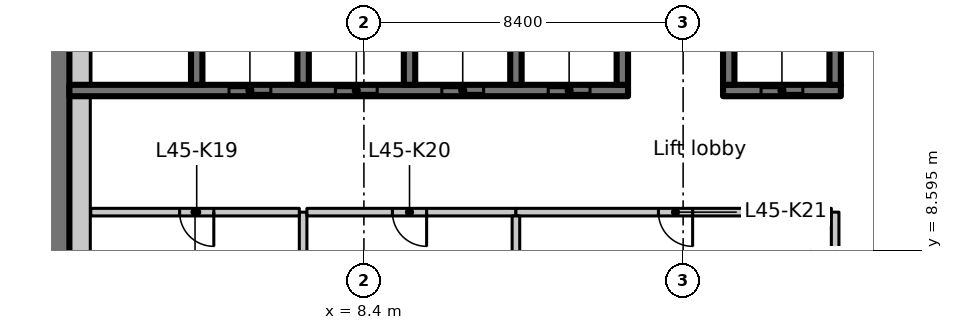
"""IFC4 building model, lengths in metres.
Left out: names, types, materials, properties, quantities, classifications, styles, units other than length and angle.
Written with IfcOpenShell. Run it as: python <this file> out.ifc"""

import sys

from ifc_helpers import new_model, si_unit, direction, frame, frame_2d, origin, place, context, subcontext, project, spatial, rectangle, extrude, element, fill, save


model = new_model("IFC4")
c1 = context("Model", 3, precision=1e-05, world=origin(), true_north=direction((0.0, 1.0)))
c2 = subcontext(c1, "Body", "Model", "MODEL_VIEW")
j1 = project(units=[si_unit("LENGTHUNIT", "METRE"), si_unit("PLANEANGLEUNIT", "RADIAN")], contexts=[c1])
p1 = place(None, origin())
s1 = spatial("IfcSite", under=j1, at=p1, CompositionType="ELEMENT")
p2 = place(p1, origin())
s2 = spatial("IfcBuilding", under=s1, at=p2, CompositionType="ELEMENT")
p3 = place(p2, frame((0.0, 0.0, 181.2)))
s3 = spatial("IfcBuildingStorey", under=s2, at=p3, CompositionType="ELEMENT", Elevation=181.2)
p4 = place(p3, frame((0.325, 7.286, 0.0), z_axis=(0.0, 0.0, 1.0), x_axis=(0.0, 1.0, 0.0)))
e1 = element("IfcWall", 1, at=p4, inside=s3, PredefinedType="SHEAR", context=c2, shape_type="SweptSolid", body=[
    extrude(rectangle(XDim=8.864, YDim=0.65, at=frame_2d((4.432, 0.0))), origin(), (0.0, 0.0, 1.0), 3.35),
])
p5 = place(p3, frame((0.65, 12.8, 0.0), z_axis=(0.0, 0.0, 1.0), x_axis=(1.0, 0.0, 0.0)))
e2 = element("IfcWall", 2, at=p5, inside=s3, PredefinedType="SHEAR", context=c2, shape_type="SweptSolid", body=[
    extrude(rectangle(XDim=14.7, YDim=0.3, at=frame_2d((7.35, 0.0))), origin(), (0.0, 0.0, 1.0), 3.35),
])
p6 = place(p5, frame((4.2, 0.0, 0.0)))
e3 = element("IfcOpeningElement", 3, at=p6, cuts=e2, PredefinedType="OPENING", context=c2, shape_type="SweptSolid", body=[
    extrude(rectangle(XDim=1.1, YDim=2.3, at=frame_2d((0.55, 1.15))), frame((0.0, 0.16, 0.0), z_axis=(0.0, -1.0, 0.0), x_axis=(1.0, 0.0, 0.0)), (0.0, 0.0, 1.0), 0.32),
])
p7 = place(p5, frame((7.0, 0.0, 0.0)))
e4 = element("IfcOpeningElement", 4, at=p7, cuts=e2, PredefinedType="OPENING", context=c2, shape_type="SweptSolid", body=[
    extrude(rectangle(XDim=1.1, YDim=2.3, at=frame_2d((0.55, 1.15))), frame((0.0, 0.16, 0.0), z_axis=(0.0, -1.0, 0.0), x_axis=(1.0, 0.0, 0.0)), (0.0, 0.0, 1.0), 0.32),
])
p8 = place(p5, frame((9.8, 0.0, 0.0)))
e5 = element("IfcOpeningElement", 5, at=p8, cuts=e2, PredefinedType="OPENING", context=c2, shape_type="SweptSolid", body=[
    extrude(rectangle(XDim=1.1, YDim=2.3, at=frame_2d((0.55, 1.15))), frame((0.0, 0.16, 0.0), z_axis=(0.0, -1.0, 0.0), x_axis=(1.0, 0.0, 0.0)), (0.0, 0.0, 1.0), 0.32),
])
p9 = place(p5, frame((12.6, 0.0, 0.0)))
e6 = element("IfcOpeningElement", 6, at=p9, cuts=e2, PredefinedType="OPENING", context=c2, shape_type="SweptSolid", body=[
    extrude(rectangle(XDim=1.1, YDim=2.3, at=frame_2d((0.55, 1.15))), frame((0.0, 0.16, 0.0), z_axis=(0.0, -1.0, 0.0), x_axis=(1.0, 0.0, 0.0)), (0.0, 0.0, 1.0), 0.32),
])
for number, where, z_axis, x_axis in (
    (7, (4.0, 12.95, 0.0), (0.0, 0.0, 1.0), (0.0, 1.0, 0.0)),
    (8, (6.8, 12.95, 0.0), (0.0, 0.0, 1.0), (0.0, 1.0, 0.0)),
    (9, (9.6, 12.95, 0.0), (0.0, 0.0, 1.0), (0.0, 1.0, 0.0)),
    (10, (12.4, 12.95, 0.0), (0.0, 0.0, 1.0), (0.0, 1.0, 0.0)),
    (11, (15.2, 12.95, 0.0), (0.0, 0.0, 1.0), (0.0, 1.0, 0.0)),
):
    element("IfcWall", number, at=place(p3, frame(where, z_axis=z_axis, x_axis=x_axis)), inside=s3, PredefinedType="SHEAR", context=c2, shape_type="SweptSolid", body=[
        extrude(rectangle(XDim=3.2, YDim=0.3, at=frame_2d((1.6, 0.0))), origin(), (0.0, 0.0, 1.0), 3.35),
    ])
p10 = place(p3, frame((17.85, 12.8, 0.0), z_axis=(0.0, 0.0, 1.0), x_axis=(1.0, 0.0, 0.0)))
e12 = element("IfcWall", 12, at=p10, inside=s3, PredefinedType="SHEAR", context=c2, shape_type="SweptSolid", body=[
    extrude(rectangle(XDim=3.1, YDim=0.3, at=frame_2d((1.55, 0.0))), origin(), (0.0, 0.0, 1.0), 3.35),
])
p11 = place(p10, frame((1.0, 0.0, 0.0)))
e13 = element("IfcOpeningElement", 13, at=p11, cuts=e12, PredefinedType="OPENING", context=c2, shape_type="SweptSolid", body=[
    extrude(rectangle(XDim=1.1, YDim=2.3, at=frame_2d((0.55, 1.15))), frame((0.0, 0.16, 0.0), z_axis=(0.0, -1.0, 0.0), x_axis=(1.0, 0.0, 0.0)), (0.0, 0.0, 1.0), 0.32),
])
for number, where, z_axis, x_axis in (
    (14, (18.0, 12.95, 0.0), (0.0, 0.0, 1.0), (0.0, 1.0, 0.0)),
    (15, (20.8, 12.95, 0.0), (0.0, 0.0, 1.0), (0.0, 1.0, 0.0)),
):
    element("IfcWall", number, at=place(p3, frame(where, z_axis=z_axis, x_axis=x_axis)), inside=s3, PredefinedType="SHEAR", context=c2, shape_type="SweptSolid", body=[
        extrude(rectangle(XDim=3.2, YDim=0.3, at=frame_2d((1.6, 0.0))), origin(), (0.0, 0.0, 1.0), 3.35),
    ])
p12 = place(p3, frame((6.8, 9.6, 0.0), z_axis=(0.0, 0.0, 1.0), x_axis=(0.0, -1.0, 0.0)))
e16 = element("IfcWall", 16, at=p12, inside=s3, PredefinedType="PARTITIONING", context=c2, shape_type="SweptSolid", body=[
    extrude(rectangle(XDim=2.5, YDim=0.2, at=frame_2d((1.25, 0.0))), origin(), (0.0, 0.0, 1.0), 3.35),
])
p13 = place(p3, frame((6.7, 9.6, 0.0), z_axis=(0.0, 0.0, 1.0), x_axis=(-1.0, 0.0, 0.0)))
e17 = element("IfcWall", 17, at=p13, inside=s3, PredefinedType="PARTITIONING", context=c2, shape_type="SweptSolid", body=[
    extrude(rectangle(XDim=5.488, YDim=0.2, at=frame_2d((2.744, 0.0))), origin(), (0.0, 0.0, 1.0), 3.35),
])
p14 = place(p13, frame((2.25, 0.0, 0.0)))
e18 = element("IfcOpeningElement", 18, at=p14, cuts=e17, PredefinedType="OPENING", context=c2, shape_type="SweptSolid", body=[
    extrude(rectangle(XDim=0.9, YDim=2.1, at=frame_2d((0.45, 1.05))), frame((0.0, 0.11, 0.0), z_axis=(0.0, -1.0, 0.0), x_axis=(1.0, 0.0, 0.0)), (0.0, 0.0, 1.0), 0.22),
])
p15 = place(p3, frame((12.4, 9.6, 0.0), z_axis=(0.0, 0.0, 1.0), x_axis=(-1.0, 0.0, 0.0)))
e19 = element("IfcWall", 19, at=p15, inside=s3, PredefinedType="PARTITIONING", context=c2, shape_type="SweptSolid", body=[
    extrude(rectangle(XDim=5.5, YDim=0.2, at=frame_2d((2.75, 0.0))), origin(), (0.0, 0.0, 1.0), 3.35),
])
p16 = place(p15, frame((2.35, 0.0, 0.0)))
e20 = element("IfcOpeningElement", 20, at=p16, cuts=e19, PredefinedType="OPENING", context=c2, shape_type="SweptSolid", body=[
    extrude(rectangle(XDim=0.9, YDim=2.1, at=frame_2d((0.45, 1.05))), frame((0.0, 0.11, 0.0), z_axis=(0.0, -1.0, 0.0), x_axis=(1.0, 0.0, 0.0)), (0.0, 0.0, 1.0), 0.22),
])
p17 = place(p3, frame((20.8, 7.1, 0.0), z_axis=(0.0, 0.0, 1.0), x_axis=(0.0, 1.0, 0.0)))
e21 = element("IfcWall", 21, at=p17, inside=s3, PredefinedType="PARTITIONING", context=c2, shape_type="SweptSolid", body=[
    extrude(rectangle(XDim=2.5, YDim=0.2, at=frame_2d((1.25, 0.0))), origin(), (0.0, 0.0, 1.0), 3.35),
])
p18 = place(p3, frame((20.7, 9.6, 0.0), z_axis=(0.0, 0.0, 1.0), x_axis=(-1.0, 0.0, 0.0)))
e22 = element("IfcWall", 22, at=p18, inside=s3, PredefinedType="PARTITIONING", context=c2, shape_type="SweptSolid", body=[
    extrude(rectangle(XDim=8.3, YDim=0.2, at=frame_2d((4.15, 0.0))), origin(), (0.0, 0.0, 1.0), 3.35),
])
p19 = place(p18, frame((3.65, 0.0, 0.0)))
e23 = element("IfcOpeningElement", 23, at=p19, cuts=e22, PredefinedType="OPENING", context=c2, shape_type="SweptSolid", body=[
    extrude(rectangle(XDim=0.9, YDim=2.1, at=frame_2d((0.45, 1.05))), frame((0.0, 0.11, 0.0), z_axis=(0.0, -1.0, 0.0), x_axis=(1.0, 0.0, 0.0)), (0.0, 0.0, 1.0), 0.22),
])
p20 = place(p3, frame((12.4, 9.5, 0.0), z_axis=(0.0, 0.0, 1.0), x_axis=(0.0, -1.0, 0.0)))
e24 = element("IfcWall", 24, at=p20, inside=s3, PredefinedType="PARTITIONING", context=c2, shape_type="SweptSolid", body=[
    extrude(rectangle(XDim=2.4, YDim=0.2, at=frame_2d((1.2, 0.0))), origin(), (0.0, 0.0, 1.0), 3.35),
])
p21 = place(p3, frame((0.925, 7.286, 0.0), z_axis=(0.0, 0.0, 1.0), x_axis=(0.0, 1.0, 0.0)))
e25 = element("IfcWall", 25, at=p21, inside=s3, PredefinedType="PARTITIONING", context=c2, shape_type="SweptSolid", body=[
    extrude(rectangle(XDim=5.364, YDim=0.55, at=frame_2d((2.682, 0.0))), origin(), (0.0, 0.0, 1.0), 3.35),
])
p22 = place(p3, frame((0.925, 12.95, 0.0), z_axis=(0.0, 0.0, 1.0), x_axis=(0.0, 1.0, 0.0)))
e26 = element("IfcWall", 26, at=p22, inside=s3, PredefinedType="PARTITIONING", context=c2, shape_type="SweptSolid", body=[
    extrude(rectangle(XDim=2.65, YDim=0.55, at=frame_2d((1.325, 0.0))), origin(), (0.0, 0.0, 1.0), 3.35),
])
p23 = place(p6, origin())
e27 = element("IfcDoor", 27, at=p23, inside=s3, OperationType="SLIDING_TO_LEFT", PredefinedType="DOOR", context=c2, shape_type="SweptSolid", body=[
    extrude(rectangle(XDim=1.1, YDim=2.3, at=frame_2d((0.55, 1.15))), frame((0.0, 0.025, 0.0), z_axis=(0.0, -1.0, 0.0), x_axis=(1.0, 0.0, 0.0)), (0.0, 0.0, 1.0), 0.05),
])
fill(e3, e27)
p24 = place(p7, origin())
e28 = element("IfcDoor", 28, at=p24, inside=s3, OperationType="SLIDING_TO_LEFT", PredefinedType="DOOR", context=c2, shape_type="SweptSolid", body=[
    extrude(rectangle(XDim=1.1, YDim=2.3, at=frame_2d((0.55, 1.15))), frame((0.0, 0.025, 0.0), z_axis=(0.0, -1.0, 0.0), x_axis=(1.0, 0.0, 0.0)), (0.0, 0.0, 1.0), 0.05),
])
fill(e4, e28)
p25 = place(p8, origin())
e29 = element("IfcDoor", 29, at=p25, inside=s3, OperationType="SLIDING_TO_LEFT", PredefinedType="DOOR", context=c2, shape_type="SweptSolid", body=[
    extrude(rectangle(XDim=1.1, YDim=2.3, at=frame_2d((0.55, 1.15))), frame((0.0, 0.025, 0.0), z_axis=(0.0, -1.0, 0.0), x_axis=(1.0, 0.0, 0.0)), (0.0, 0.0, 1.0), 0.05),
])
fill(e5, e29)
p26 = place(p9, origin())
e30 = element("IfcDoor", 30, at=p26, inside=s3, OperationType="SLIDING_TO_LEFT", PredefinedType="DOOR", context=c2, shape_type="SweptSolid", body=[
    extrude(rectangle(XDim=1.1, YDim=2.3, at=frame_2d((0.55, 1.15))), frame((0.0, 0.025, 0.0), z_axis=(0.0, -1.0, 0.0), x_axis=(1.0, 0.0, 0.0)), (0.0, 0.0, 1.0), 0.05),
])
fill(e6, e30)
p27 = place(p11, origin())
e31 = element("IfcDoor", 31, at=p27, inside=s3, OperationType="SLIDING_TO_LEFT", PredefinedType="DOOR", context=c2, shape_type="SweptSolid", body=[
    extrude(rectangle(XDim=1.1, YDim=2.3, at=frame_2d((0.55, 1.15))), frame((0.0, 0.025, 0.0), z_axis=(0.0, -1.0, 0.0), x_axis=(1.0, 0.0, 0.0)), (0.0, 0.0, 1.0), 0.05),
])
fill(e13, e31)
p28 = place(p14, origin())
e32 = element("IfcDoor", 32, at=p28, inside=s3, OperationType="SINGLE_SWING_RIGHT", PredefinedType="DOOR", context=c2, shape_type="SweptSolid", body=[
    extrude(rectangle(XDim=0.9, YDim=2.1, at=frame_2d((0.45, 1.05))), frame((0.0, 0.025, 0.0), z_axis=(0.0, -1.0, 0.0), x_axis=(1.0, 0.0, 0.0)), (0.0, 0.0, 1.0), 0.05),
])
fill(e18, e32)
p29 = place(p16, origin())
e33 = element("IfcDoor", 33, at=p29, inside=s3, OperationType="SINGLE_SWING_LEFT", PredefinedType="DOOR", context=c2, shape_type="SweptSolid", body=[
    extrude(rectangle(XDim=0.9, YDim=2.1, at=frame_2d((0.45, 1.05))), frame((0.0, 0.025, 0.0), z_axis=(0.0, -1.0, 0.0), x_axis=(1.0, 0.0, 0.0)), (0.0, 0.0, 1.0), 0.05),
])
fill(e20, e33)
p30 = place(p19, origin())
e34 = element("IfcDoor", 34, at=p30, inside=s3, OperationType="SINGLE_SWING_RIGHT", PredefinedType="DOOR", context=c2, shape_type="SweptSolid", body=[
    extrude(rectangle(XDim=0.9, YDim=2.1, at=frame_2d((0.45, 1.05))), frame((0.0, 0.025, 0.0), z_axis=(0.0, -1.0, 0.0), x_axis=(1.0, 0.0, 0.0)), (0.0, 0.0, 1.0), 0.05),
])
fill(e23, e34)
save(model, sys.argv[1])
